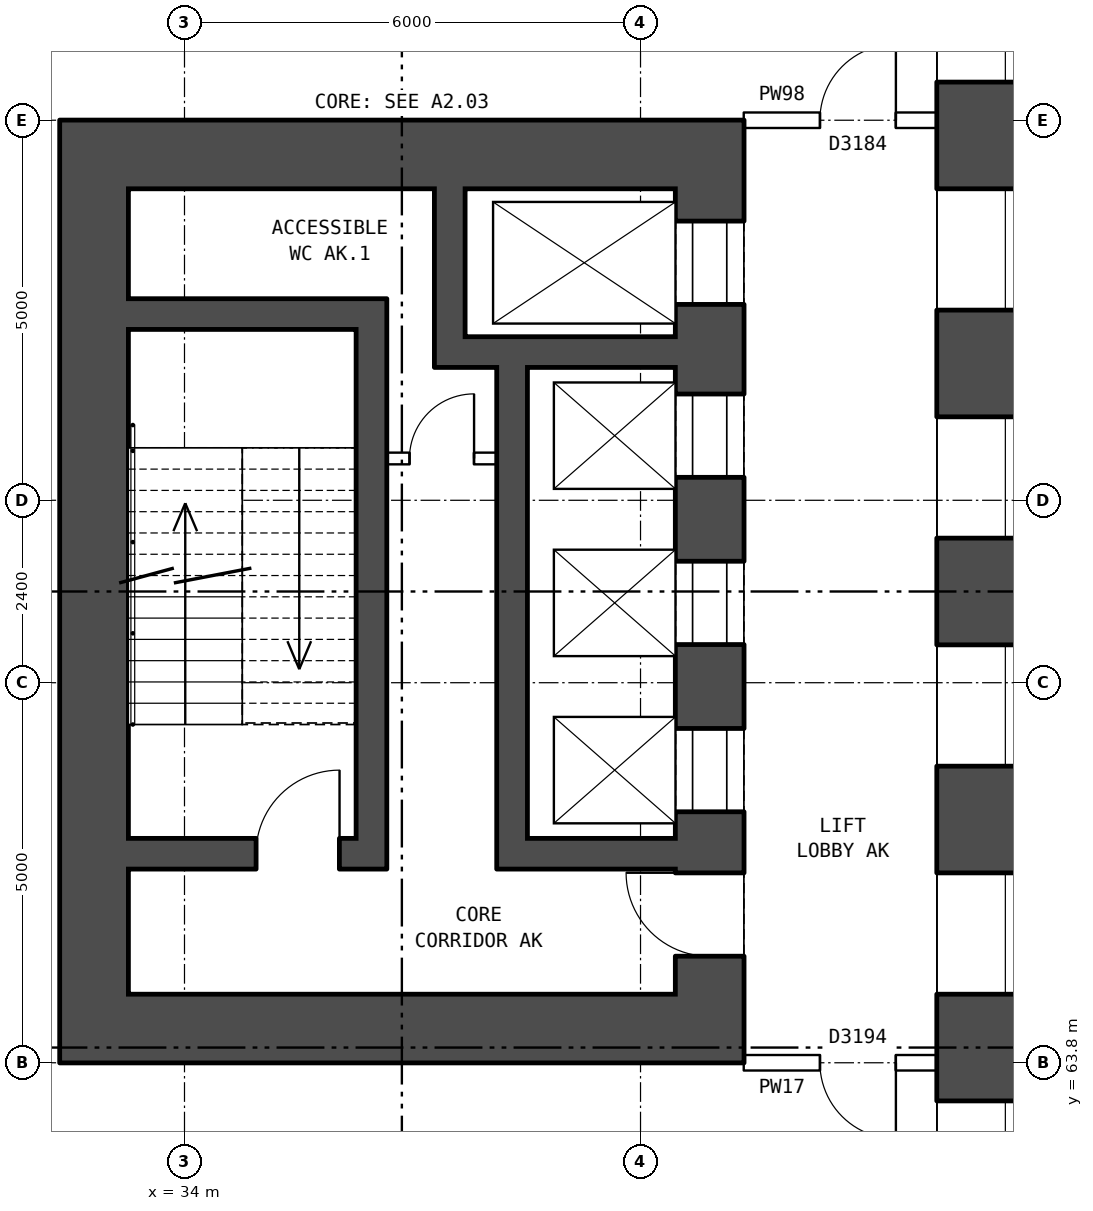
"""IFC4 building model, lengths in metres.
Left out: names, types, materials, properties, quantities, classifications, styles, units other than length and angle.
Written with IfcOpenShell. Run it as: python <this file> out.ifc"""

import sys

from ifc_helpers import new_model, si_unit, direction, frame, frame_2d, origin, place, context, subcontext, project, spatial, rectangle, extrude, element, fill, save


model = new_model("IFC4")
c1 = context("Model", 3, precision=1e-05, world=origin(), true_north=direction((0.0, 1.0)))
c2 = subcontext(c1, "Body", "Model", "MODEL_VIEW")
j1 = project(units=[si_unit("LENGTHUNIT", "METRE"), si_unit("PLANEANGLEUNIT", "RADIAN")], contexts=[c1])
p1 = place(None, origin())
s1 = spatial("IfcSite", under=j1, at=p1, CompositionType="ELEMENT")
p2 = place(p1, origin())
s2 = spatial("IfcBuilding", under=s1, at=p2, CompositionType="ELEMENT")
p3 = place(p2, frame((0.0, 0.0, 10.1)))
s3 = spatial("IfcBuildingStorey", under=s2, at=p3, CompositionType="ELEMENT", Elevation=10.1)
p4 = place(p3, frame((44.5, 56.4, -0.3), z_axis=(0.0, 0.0, 1.0), x_axis=(0.0, 1.0, 0.0)))
e1 = element("IfcWall", 1, at=p4, inside=s3, PredefinedType="SHEAR", context=c2, shape_type="SweptSolid", body=[
    extrude(rectangle(XDim=27.2, YDim=1.2, at=frame_2d((13.6, 0.0))), origin(), (0.0, 0.0, 1.0), 4.4),
])
p5 = place(p4, frame((2.3, 0.0, 0.8)))
e2 = element("IfcOpeningElement", 2, at=p5, cuts=e1, PredefinedType="OPENING", context=c2, shape_type="SweptSolid", body=[
    extrude(rectangle(XDim=1.6, YDim=1.8, at=frame_2d((0.8, 0.9))), frame((0.0, 0.61, 0.0), z_axis=(0.0, -1.0, 0.0), x_axis=(1.0, 0.0, 0.0)), (0.0, 0.0, 1.0), 1.22),
])
p6 = place(p4, frame((5.3, 0.0, 0.8)))
e3 = element("IfcOpeningElement", 3, at=p6, cuts=e1, PredefinedType="OPENING", context=c2, shape_type="SweptSolid", body=[
    extrude(rectangle(XDim=1.6, YDim=1.8, at=frame_2d((0.8, 0.9))), frame((0.0, 0.61, 0.0), z_axis=(0.0, -1.0, 0.0), x_axis=(1.0, 0.0, 0.0)), (0.0, 0.0, 1.0), 1.22),
])
p7 = place(p4, frame((8.3, 0.0, 0.8)))
e4 = element("IfcOpeningElement", 4, at=p7, cuts=e1, PredefinedType="OPENING", context=c2, shape_type="SweptSolid", body=[
    extrude(rectangle(XDim=1.6, YDim=1.8, at=frame_2d((0.8, 0.9))), frame((0.0, 0.61, 0.0), z_axis=(0.0, -1.0, 0.0), x_axis=(1.0, 0.0, 0.0)), (0.0, 0.0, 1.0), 1.22),
])
p8 = place(p4, frame((11.3, 0.0, 0.8)))
e5 = element("IfcOpeningElement", 5, at=p8, cuts=e1, PredefinedType="OPENING", context=c2, shape_type="SweptSolid", body=[
    extrude(rectangle(XDim=1.6, YDim=1.8, at=frame_2d((0.8, 0.9))), frame((0.0, 0.61, 0.0), z_axis=(0.0, -1.0, 0.0), x_axis=(1.0, 0.0, 0.0)), (0.0, 0.0, 1.0), 1.22),
])
p9 = place(p4, frame((14.3, 0.0, 0.8)))
e6 = element("IfcOpeningElement", 6, at=p9, cuts=e1, PredefinedType="OPENING", context=c2, shape_type="SweptSolid", body=[
    extrude(rectangle(XDim=1.6, YDim=1.8, at=frame_2d((0.8, 0.9))), frame((0.0, 0.61, 0.0), z_axis=(0.0, -1.0, 0.0), x_axis=(1.0, 0.0, 0.0)), (0.0, 0.0, 1.0), 1.22),
])
p10 = place(p4, frame((17.3, 0.0, 0.8)))
e7 = element("IfcOpeningElement", 7, at=p10, cuts=e1, PredefinedType="OPENING", context=c2, shape_type="SweptSolid", body=[
    extrude(rectangle(XDim=1.6, YDim=1.8, at=frame_2d((0.8, 0.9))), frame((0.0, 0.61, 0.0), z_axis=(0.0, -1.0, 0.0), x_axis=(1.0, 0.0, 0.0)), (0.0, 0.0, 1.0), 1.22),
])
p11 = place(p4, frame((20.3, 0.0, 0.8)))
e8 = element("IfcOpeningElement", 8, at=p11, cuts=e1, PredefinedType="OPENING", context=c2, shape_type="SweptSolid", body=[
    extrude(rectangle(XDim=1.6, YDim=1.8, at=frame_2d((0.8, 0.9))), frame((0.0, 0.61, 0.0), z_axis=(0.0, -1.0, 0.0), x_axis=(1.0, 0.0, 0.0)), (0.0, 0.0, 1.0), 1.22),
])
p12 = place(p4, frame((23.3, 0.0, 0.8)))
e9 = element("IfcOpeningElement", 9, at=p12, cuts=e1, PredefinedType="OPENING", context=c2, shape_type="SweptSolid", body=[
    extrude(rectangle(XDim=1.6, YDim=1.8, at=frame_2d((0.8, 0.9))), frame((0.0, 0.61, 0.0), z_axis=(0.0, -1.0, 0.0), x_axis=(1.0, 0.0, 0.0)), (0.0, 0.0, 1.0), 1.22),
])
p13 = place(p3, frame((40.91, 75.3, 0.0), z_axis=(0.0, 0.0, 1.0), x_axis=(0.0, -1.0, 0.0)))
e10 = element("IfcWall", 10, at=p13, inside=s3, PredefinedType="SHEAR", context=c2, shape_type="SweptSolid", body=[
    extrude(rectangle(XDim=10.6, YDim=0.9, at=frame_2d((5.3, 0.0))), origin(), (0.0, 0.0, 1.0), 4.3),
])
p14 = place(p13, frame((0.425, 0.0, 0.0)))
e11 = element("IfcOpeningElement", 11, at=p14, cuts=e10, PredefinedType="OPENING", context=c2, shape_type="SweptSolid", body=[
    extrude(rectangle(XDim=1.1, YDim=2.1, at=frame_2d((0.55, 1.05))), frame((0.0, 0.46, 0.0), z_axis=(0.0, -1.0, 0.0), x_axis=(1.0, 0.0, 0.0)), (0.0, 0.0, 1.0), 0.92),
])
p15 = place(p13, frame((2.7, 0.0, 0.0)))
e12 = element("IfcOpeningElement", 12, at=p15, cuts=e10, PredefinedType="OPENING", context=c2, shape_type="SweptSolid", body=[
    extrude(rectangle(XDim=1.1, YDim=2.1, at=frame_2d((0.55, 1.05))), frame((0.0, 0.46, 0.0), z_axis=(0.0, -1.0, 0.0), x_axis=(1.0, 0.0, 0.0)), (0.0, 0.0, 1.0), 0.92),
])
p16 = place(p13, frame((4.9, 0.0, 0.0)))
e13 = element("IfcOpeningElement", 13, at=p16, cuts=e10, PredefinedType="OPENING", context=c2, shape_type="SweptSolid", body=[
    extrude(rectangle(XDim=1.1, YDim=2.1, at=frame_2d((0.55, 1.05))), frame((0.0, 0.46, 0.0), z_axis=(0.0, -1.0, 0.0), x_axis=(1.0, 0.0, 0.0)), (0.0, 0.0, 1.0), 0.92),
])
p17 = place(p13, frame((7.1, 0.0, 0.0)))
e14 = element("IfcOpeningElement", 14, at=p17, cuts=e10, PredefinedType="OPENING", context=c2, shape_type="SweptSolid", body=[
    extrude(rectangle(XDim=1.1, YDim=2.1, at=frame_2d((0.55, 1.05))), frame((0.0, 0.46, 0.0), z_axis=(0.0, -1.0, 0.0), x_axis=(1.0, 0.0, 0.0)), (0.0, 0.0, 1.0), 0.92),
])
p18 = place(p13, frame((9.0, 0.0, 0.0)))
e15 = element("IfcOpeningElement", 15, at=p18, cuts=e10, PredefinedType="OPENING", context=c2, shape_type="SweptSolid", body=[
    extrude(rectangle(XDim=1.1, YDim=2.1, at=frame_2d((0.55, 1.05))), frame((0.0, 0.46, 0.0), z_axis=(0.0, -1.0, 0.0), x_axis=(1.0, 0.0, 0.0)), (0.0, 0.0, 1.0), 0.92),
])
p19 = place(p3, frame((32.81, 75.3, 0.0), z_axis=(0.0, 0.0, 1.0), x_axis=(0.0, -1.0, 0.0)))
e16 = element("IfcWall", 16, at=p19, inside=s3, PredefinedType="SHEAR", context=c2, shape_type="SweptSolid", body=[
    extrude(rectangle(XDim=10.6, YDim=0.9, at=frame_2d((5.3, 0.0))), origin(), (0.0, 0.0, 1.0), 4.3),
])
for number, where, z_axis, x_axis in (
    (17, (41.36, 75.75, 0.0), (0.0, 0.0, 1.0), (-1.0, 0.0, 0.0)),
    (18, (41.36, 64.25, 0.0), (0.0, 0.0, 1.0), (-1.0, 0.0, 0.0)),
):
    element("IfcWall", number, at=place(p3, frame(where, z_axis=z_axis, x_axis=x_axis)), inside=s3, PredefinedType="SHEAR", context=c2, shape_type="SweptSolid", body=[
        extrude(rectangle(XDim=9.0, YDim=0.9, at=frame_2d((4.5, 0.0))), origin(), (0.0, 0.0, 1.0), 4.3),
    ])
p20 = place(p3, frame((36.26, 73.65, 0.0), z_axis=(0.0, 0.0, 1.0), x_axis=(-1.0, 0.0, 0.0)))
e19 = element("IfcWall", 19, at=p20, inside=s3, PredefinedType="SHEAR", context=c2, shape_type="SweptSolid", body=[
    extrude(rectangle(XDim=3.0, YDim=0.4, at=frame_2d((1.5, 0.0))), origin(), (0.0, 0.0, 1.0), 4.3),
])
p21 = place(p3, frame((40.46, 73.15, 0.0), z_axis=(0.0, 0.0, 1.0), x_axis=(-1.0, 0.0, 0.0)))
e20 = element("IfcWall", 20, at=p21, inside=s3, PredefinedType="SHEAR", context=c2, shape_type="SweptSolid", body=[
    extrude(rectangle(XDim=3.17, YDim=0.4, at=frame_2d((1.585, 0.0))), origin(), (0.0, 0.0, 1.0), 4.3),
])
p22 = place(p3, frame((38.11, 71.75, 0.0), z_axis=(0.0, 0.0, 1.0), x_axis=(-1.0, 0.0, 0.0)))
e21 = element("IfcWall", 21, at=p22, inside=s3, PredefinedType="PARTITIONING", context=c2, shape_type="SweptSolid", body=[
    extrude(rectangle(XDim=1.45, YDim=0.15, at=frame_2d((0.725, 0.0))), origin(), (0.0, 0.0, 1.0), 4.3),
])
p23 = place(p22, frame((0.3, 0.0, 0.0)))
e22 = element("IfcOpeningElement", 22, at=p23, cuts=e21, PredefinedType="OPENING", context=c2, shape_type="SweptSolid", body=[
    extrude(rectangle(XDim=0.85, YDim=2.1, at=frame_2d((0.425, 1.05))), frame((0.0, 0.085, 0.0), z_axis=(0.0, -1.0, 0.0), x_axis=(1.0, 0.0, 0.0)), (0.0, 0.0, 1.0), 0.17),
])
p24 = place(p3, frame((40.46, 66.55, 0.0), z_axis=(0.0, 0.0, 1.0), x_axis=(-1.0, 0.0, 0.0)))
e23 = element("IfcWall", 23, at=p24, inside=s3, PredefinedType="SHEAR", context=c2, shape_type="SweptSolid", body=[
    extrude(rectangle(XDim=1.95, YDim=0.4, at=frame_2d((0.975, 0.0))), origin(), (0.0, 0.0, 1.0), 4.3),
])
p25 = place(p3, frame((36.26, 66.55, 0.0), z_axis=(0.0, 0.0, 1.0), x_axis=(-1.0, 0.0, 0.0)))
e24 = element("IfcWall", 24, at=p25, inside=s3, PredefinedType="SHEAR", context=c2, shape_type="SweptSolid", body=[
    extrude(rectangle(XDim=3.0, YDim=0.4, at=frame_2d((1.5, 0.0))), origin(), (0.0, 0.0, 1.0), 4.3),
])
p26 = place(p25, frame((0.22, 0.0, 0.0)))
e25 = element("IfcOpeningElement", 25, at=p26, cuts=e24, PredefinedType="OPENING", context=c2, shape_type="SweptSolid", body=[
    extrude(rectangle(XDim=1.1, YDim=2.1, at=frame_2d((0.55, 1.05))), frame((0.0, 0.21, 0.0), z_axis=(0.0, -1.0, 0.0), x_axis=(1.0, 0.0, 0.0)), (0.0, 0.0, 1.0), 0.42),
])
p27 = place(p3, frame((38.31, 72.95, 0.0), z_axis=(0.0, 0.0, 1.0), x_axis=(0.0, -1.0, 0.0)))
e26 = element("IfcWall", 26, at=p27, inside=s3, PredefinedType="SHEAR", context=c2, shape_type="SweptSolid", body=[
    extrude(rectangle(XDim=6.6, YDim=0.4, at=frame_2d((3.3, 0.0))), origin(), (0.0, 0.0, 1.0), 4.3),
])
p28 = place(p3, frame((37.49, 75.3, 0.0), z_axis=(0.0, 0.0, 1.0), x_axis=(0.0, -1.0, 0.0)))
e27 = element("IfcWall", 27, at=p28, inside=s3, PredefinedType="SHEAR", context=c2, shape_type="SweptSolid", body=[
    extrude(rectangle(XDim=1.95, YDim=0.4, at=frame_2d((0.975, 0.0))), origin(), (0.0, 0.0, 1.0), 4.3),
])
p29 = place(p3, frame((36.46, 73.85, 0.0), z_axis=(0.0, 0.0, 1.0), x_axis=(0.0, -1.0, 0.0)))
e28 = element("IfcWall", 28, at=p29, inside=s3, PredefinedType="SHEAR", context=c2, shape_type="SweptSolid", body=[
    extrude(rectangle(XDim=7.5, YDim=0.4, at=frame_2d((3.75, 0.0))), origin(), (0.0, 0.0, 1.0), 4.3),
])
p30 = place(p3, frame((41.36, 63.8, 0.0), z_axis=(0.0, 0.0, 1.0), x_axis=(1.0, 0.0, 0.0)))
e29 = element("IfcWall", 29, at=p30, inside=s3, PredefinedType="PARTITIONING", context=c2, shape_type="SweptSolid", body=[
    extrude(rectangle(XDim=2.54, YDim=0.2, at=frame_2d((1.27, 0.0))), origin(), (0.0, 0.0, 1.0), 4.3),
])
p31 = place(p30, frame((1.0, 0.0, 0.0)))
e30 = element("IfcOpeningElement", 30, at=p31, cuts=e29, PredefinedType="OPENING", context=c2, shape_type="SweptSolid", body=[
    extrude(rectangle(XDim=1.0, YDim=2.1, at=frame_2d((0.5, 1.05))), frame((0.0, 0.11, 0.0), z_axis=(0.0, -1.0, 0.0), x_axis=(1.0, 0.0, 0.0)), (0.0, 0.0, 1.0), 0.22),
])
p32 = place(p3, frame((41.36, 76.2, 0.0), z_axis=(0.0, 0.0, 1.0), x_axis=(1.0, 0.0, 0.0)))
e31 = element("IfcWall", 31, at=p32, inside=s3, PredefinedType="PARTITIONING", context=c2, shape_type="SweptSolid", body=[
    extrude(rectangle(XDim=2.54, YDim=0.2, at=frame_2d((1.27, 0.0))), origin(), (0.0, 0.0, 1.0), 4.3),
])
p33 = place(p32, frame((1.0, 0.0, 0.0)))
e32 = element("IfcOpeningElement", 32, at=p33, cuts=e31, PredefinedType="OPENING", context=c2, shape_type="SweptSolid", body=[
    extrude(rectangle(XDim=1.0, YDim=2.1, at=frame_2d((0.5, 1.05))), frame((0.0, 0.11, 0.0), z_axis=(0.0, -1.0, 0.0), x_axis=(1.0, 0.0, 0.0)), (0.0, 0.0, 1.0), 0.22),
])
p34 = place(p6, origin())
e33 = element("IfcWindow", 33, at=p34, inside=s3, PartitioningType="SINGLE_PANEL", PredefinedType="WINDOW", context=c2, shape_type="SweptSolid", body=[
    extrude(rectangle(XDim=1.6, YDim=1.8, at=frame_2d((0.8, 0.9))), frame((0.0, -0.27, 0.0), z_axis=(0.0, -1.0, 0.0), x_axis=(1.0, 0.0, 0.0)), (0.0, 0.0, 1.0), 0.06),
])
fill(e3, e33)
p35 = place(p7, origin())
e34 = element("IfcWindow", 34, at=p35, inside=s3, PartitioningType="SINGLE_PANEL", PredefinedType="WINDOW", context=c2, shape_type="SweptSolid", body=[
    extrude(rectangle(XDim=1.6, YDim=1.8, at=frame_2d((0.8, 0.9))), frame((0.0, -0.27, 0.0), z_axis=(0.0, -1.0, 0.0), x_axis=(1.0, 0.0, 0.0)), (0.0, 0.0, 1.0), 0.06),
])
fill(e4, e34)
p36 = place(p8, origin())
e35 = element("IfcWindow", 35, at=p36, inside=s3, PartitioningType="SINGLE_PANEL", PredefinedType="WINDOW", context=c2, shape_type="SweptSolid", body=[
    extrude(rectangle(XDim=1.6, YDim=1.8, at=frame_2d((0.8, 0.9))), frame((0.0, -0.27, 0.0), z_axis=(0.0, -1.0, 0.0), x_axis=(1.0, 0.0, 0.0)), (0.0, 0.0, 1.0), 0.06),
])
fill(e5, e35)
p37 = place(p9, origin())
e36 = element("IfcWindow", 36, at=p37, inside=s3, PartitioningType="SINGLE_PANEL", PredefinedType="WINDOW", context=c2, shape_type="SweptSolid", body=[
    extrude(rectangle(XDim=1.6, YDim=1.8, at=frame_2d((0.8, 0.9))), frame((0.0, -0.27, 0.0), z_axis=(0.0, -1.0, 0.0), x_axis=(1.0, 0.0, 0.0)), (0.0, 0.0, 1.0), 0.06),
])
fill(e6, e36)
p38 = place(p10, origin())
e37 = element("IfcWindow", 37, at=p38, inside=s3, PartitioningType="SINGLE_PANEL", PredefinedType="WINDOW", context=c2, shape_type="SweptSolid", body=[
    extrude(rectangle(XDim=1.6, YDim=1.8, at=frame_2d((0.8, 0.9))), frame((0.0, -0.27, 0.0), z_axis=(0.0, -1.0, 0.0), x_axis=(1.0, 0.0, 0.0)), (0.0, 0.0, 1.0), 0.06),
])
fill(e7, e37)
p39 = place(p11, origin())
e38 = element("IfcWindow", 38, at=p39, inside=s3, PartitioningType="SINGLE_PANEL", PredefinedType="WINDOW", context=c2, shape_type="SweptSolid", body=[
    extrude(rectangle(XDim=1.6, YDim=1.8, at=frame_2d((0.8, 0.9))), frame((0.0, -0.27, 0.0), z_axis=(0.0, -1.0, 0.0), x_axis=(1.0, 0.0, 0.0)), (0.0, 0.0, 1.0), 0.06),
])
fill(e8, e38)
p40 = place(p14, origin())
e39 = element("IfcDoor", 39, at=p40, inside=s3, OperationType="DOUBLE_DOOR_SLIDING", PredefinedType="DOOR", context=c2, shape_type="SweptSolid", body=[
    extrude(rectangle(XDim=1.1, YDim=2.1, at=frame_2d((0.55, 1.05))), frame((0.0, -0.385, 0.0), z_axis=(0.0, -1.0, 0.0), x_axis=(1.0, 0.0, 0.0)), (0.0, 0.0, 1.0), 0.05),
])
fill(e11, e39)
p41 = place(p15, origin())
e40 = element("IfcDoor", 40, at=p41, inside=s3, OperationType="DOUBLE_DOOR_SLIDING", PredefinedType="DOOR", context=c2, shape_type="SweptSolid", body=[
    extrude(rectangle(XDim=1.1, YDim=2.1, at=frame_2d((0.55, 1.05))), frame((0.0, -0.385, 0.0), z_axis=(0.0, -1.0, 0.0), x_axis=(1.0, 0.0, 0.0)), (0.0, 0.0, 1.0), 0.05),
])
fill(e12, e40)
p42 = place(p16, origin())
e41 = element("IfcDoor", 41, at=p42, inside=s3, OperationType="DOUBLE_DOOR_SLIDING", PredefinedType="DOOR", context=c2, shape_type="SweptSolid", body=[
    extrude(rectangle(XDim=1.1, YDim=2.1, at=frame_2d((0.55, 1.05))), frame((0.0, -0.385, 0.0), z_axis=(0.0, -1.0, 0.0), x_axis=(1.0, 0.0, 0.0)), (0.0, 0.0, 1.0), 0.05),
])
fill(e13, e41)
p43 = place(p17, origin())
e42 = element("IfcDoor", 42, at=p43, inside=s3, OperationType="DOUBLE_DOOR_SLIDING", PredefinedType="DOOR", context=c2, shape_type="SweptSolid", body=[
    extrude(rectangle(XDim=1.1, YDim=2.1, at=frame_2d((0.55, 1.05))), frame((0.0, -0.385, 0.0), z_axis=(0.0, -1.0, 0.0), x_axis=(1.0, 0.0, 0.0)), (0.0, 0.0, 1.0), 0.05),
])
fill(e14, e42)
p44 = place(p18, frame((1.1, 0.0, 0.0), z_axis=(0.0, 0.0, 1.0), x_axis=(-1.0, 0.0, 0.0)))
e43 = element("IfcDoor", 43, at=p44, inside=s3, OperationType="SINGLE_SWING_RIGHT", PredefinedType="DOOR", context=c2, shape_type="SweptSolid", body=[
    extrude(rectangle(XDim=1.1, YDim=2.1, at=frame_2d((0.55, 1.05))), frame((0.0, 0.435, 0.0), z_axis=(0.0, -1.0, 0.0), x_axis=(1.0, 0.0, 0.0)), (0.0, 0.0, 1.0), 0.05),
])
fill(e15, e43)
p45 = place(p26, frame((1.1, 0.0, 0.0), z_axis=(0.0, 0.0, 1.0), x_axis=(-1.0, 0.0, 0.0)))
e44 = element("IfcDoor", 44, at=p45, inside=s3, OperationType="SINGLE_SWING_RIGHT", PredefinedType="DOOR", context=c2, shape_type="SweptSolid", body=[
    extrude(rectangle(XDim=1.1, YDim=2.1, at=frame_2d((0.55, 1.05))), frame((0.0, 0.025, 0.0), z_axis=(0.0, -1.0, 0.0), x_axis=(1.0, 0.0, 0.0)), (0.0, 0.0, 1.0), 0.05),
])
fill(e25, e44)
p46 = place(p23, frame((0.85, 0.0, 0.0), z_axis=(0.0, 0.0, 1.0), x_axis=(-1.0, 0.0, 0.0)))
e45 = element("IfcDoor", 45, at=p46, inside=s3, OperationType="SINGLE_SWING_RIGHT", PredefinedType="DOOR", context=c2, shape_type="SweptSolid", body=[
    extrude(rectangle(XDim=0.85, YDim=2.1, at=frame_2d((0.425, 1.05))), frame((0.0, 0.025, 0.0), z_axis=(0.0, -1.0, 0.0), x_axis=(1.0, 0.0, 0.0)), (0.0, 0.0, 1.0), 0.05),
])
fill(e22, e45)
p47 = place(p31, frame((1.0, 0.0, 0.0), z_axis=(0.0, 0.0, 1.0), x_axis=(-1.0, 0.0, 0.0)))
e46 = element("IfcDoor", 46, at=p47, inside=s3, OperationType="SINGLE_SWING_LEFT", PredefinedType="DOOR", context=c2, shape_type="SweptSolid", body=[
    extrude(rectangle(XDim=1.0, YDim=2.1, at=frame_2d((0.5, 1.05))), frame((0.0, 0.025, 0.0), z_axis=(0.0, -1.0, 0.0), x_axis=(1.0, 0.0, 0.0)), (0.0, 0.0, 1.0), 0.05),
])
fill(e30, e46)
p48 = place(p33, origin())
e47 = element("IfcDoor", 47, at=p48, inside=s3, OperationType="SINGLE_SWING_RIGHT", PredefinedType="DOOR", context=c2, shape_type="SweptSolid", body=[
    extrude(rectangle(XDim=1.0, YDim=2.1, at=frame_2d((0.5, 1.05))), frame((0.0, 0.025, 0.0), z_axis=(0.0, -1.0, 0.0), x_axis=(1.0, 0.0, 0.0)), (0.0, 0.0, 1.0), 0.05),
])
fill(e32, e47)
save(model, sys.argv[1])
